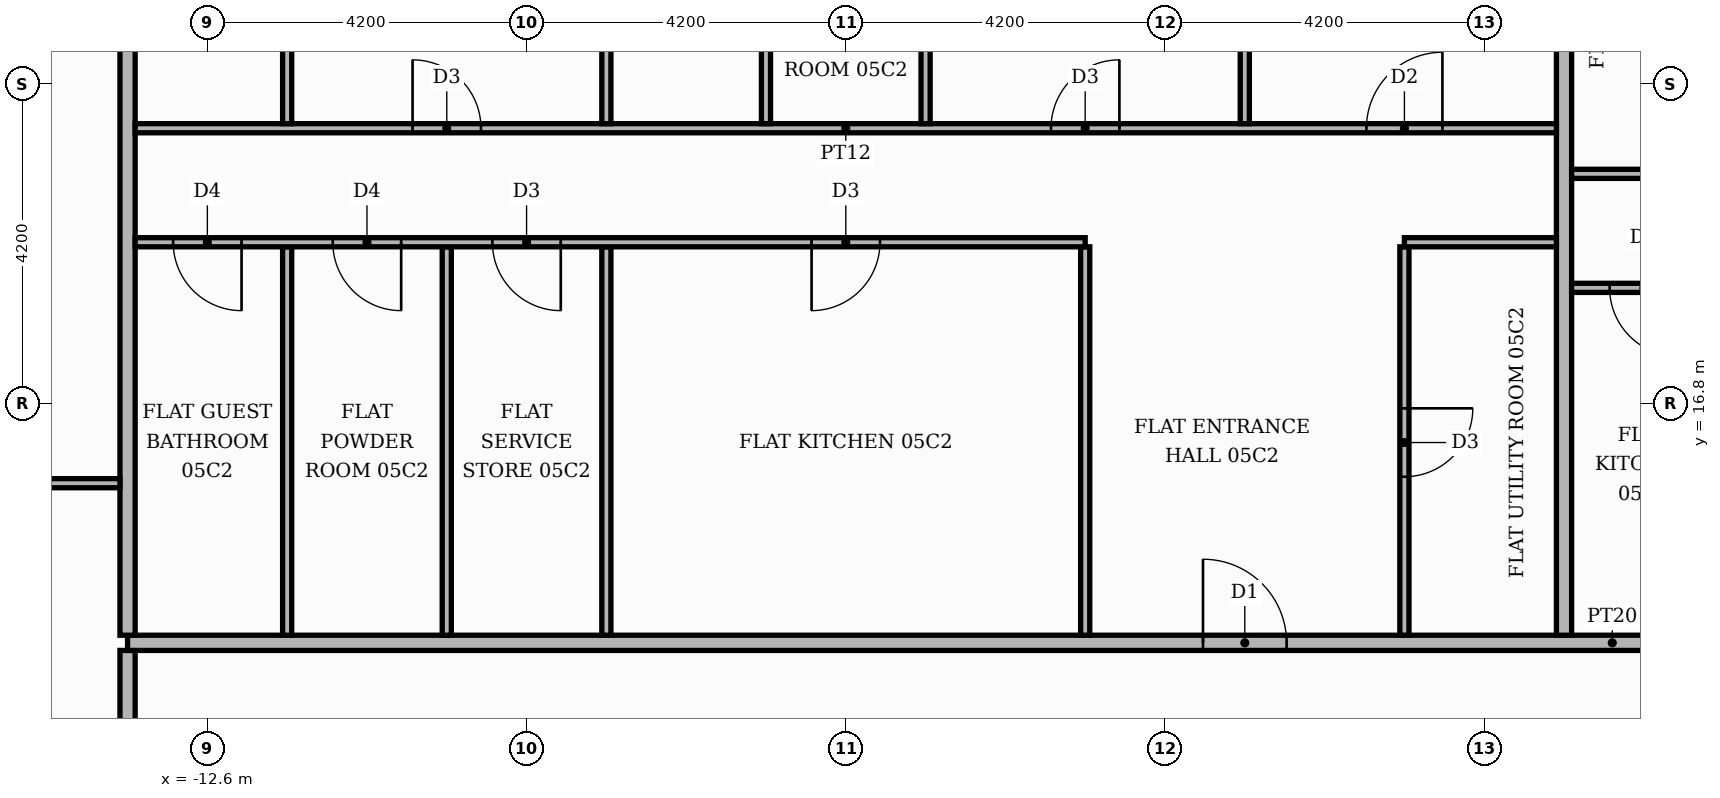
"""IFC4 building model, lengths in metres.
Left out: names, types, materials, properties, quantities, classifications, styles, units other than length and angle.
Written with IfcOpenShell. Run it as: python <this file> out.ifc"""

import sys

from ifc_helpers import new_model, si_unit, direction, frame, frame_2d, origin, place, context, subcontext, project, spatial, rectangle, extrude, element, fill, save


model = new_model("IFC4")
c1 = context("Model", 3, precision=1e-05, world=origin(), true_north=direction((0.0, 1.0)))
c2 = subcontext(c1, "Body", "Model", "MODEL_VIEW")
j1 = project(units=[si_unit("LENGTHUNIT", "METRE"), si_unit("PLANEANGLEUNIT", "RADIAN")], contexts=[c1])
p1 = place(None, origin())
s1 = spatial("IfcSite", under=j1, at=p1, CompositionType="ELEMENT")
p2 = place(p1, origin())
s2 = spatial("IfcBuilding", under=s1, at=p2, CompositionType="ELEMENT")
p3 = place(p2, frame((0.0, 0.0, 27.0)))
s3 = spatial("IfcBuildingStorey", under=s2, at=p3, CompositionType="ELEMENT", Elevation=27.0)
p4 = place(p3, frame((-13.65, -13.55, 0.0), z_axis=(0.0, 0.0, 1.0), x_axis=(0.0, 1.0, 0.0)))
e1 = element("IfcWall", 1, at=p4, inside=s3, PredefinedType="PARTITIONING", context=c2, shape_type="SweptSolid", body=[
    extrude(rectangle(XDim=27.1, YDim=0.2, at=frame_2d((13.55, 0.0))), origin(), (0.0, 0.0, 1.0), 3.48),
])
p5 = place(p4, frame((24.55, 0.0, 0.0)))
e2 = element("IfcOpeningElement", 2, at=p5, cuts=e1, PredefinedType="OPENING", context=c2, shape_type="SweptSolid", body=[
    extrude(rectangle(XDim=1.1, YDim=2.4, at=frame_2d((0.55, 1.2))), frame((0.0, 0.11, 0.0), z_axis=(0.0, -1.0, 0.0), x_axis=(1.0, 0.0, 0.0)), (0.0, 0.0, 1.0), 0.22),
])
p6 = place(p3, frame((-13.65, 13.65, 0.0), z_axis=(0.0, 0.0, 1.0), x_axis=(1.0, 0.0, 0.0)))
e3 = element("IfcWall", 3, at=p6, inside=s3, PredefinedType="PARTITIONING", context=c2, shape_type="SweptSolid", body=[
    extrude(rectangle(XDim=39.07, YDim=0.2, at=frame_2d((19.535, 0.0))), origin(), (0.0, 0.0, 1.0), 3.48),
])
p7 = place(p6, frame((24.65, 0.0, 0.0)))
e4 = element("IfcOpeningElement", 4, at=p7, cuts=e3, PredefinedType="OPENING", context=c2, shape_type="SweptSolid", body=[
    extrude(rectangle(XDim=1.1, YDim=2.4, at=frame_2d((0.55, 1.2))), frame((0.0, 0.11, 0.0), z_axis=(0.0, -1.0, 0.0), x_axis=(1.0, 0.0, 0.0)), (0.0, 0.0, 1.0), 0.22),
])
p8 = place(p6, frame((14.15, 0.0, 0.0)))
e5 = element("IfcOpeningElement", 5, at=p8, cuts=e3, PredefinedType="OPENING", context=c2, shape_type="SweptSolid", body=[
    extrude(rectangle(XDim=1.1, YDim=2.4, at=frame_2d((0.55, 1.2))), frame((0.0, 0.11, 0.0), z_axis=(0.0, -1.0, 0.0), x_axis=(1.0, 0.0, 0.0)), (0.0, 0.0, 1.0), 0.22),
])
p9 = place(p3, frame((-13.65, 13.75, 0.0), z_axis=(0.0, 0.0, 1.0), x_axis=(0.0, 1.0, 0.0)))
e6 = element("IfcWall", 6, at=p9, inside=s3, PredefinedType="PARTITIONING", context=c2, shape_type="SweptSolid", body=[
    extrude(rectangle(XDim=11.67, YDim=0.2, at=frame_2d((5.835, 0.0))), origin(), (0.0, 0.0, 1.0), 3.48),
])
for number, where, z_axis, x_axis in (
    (7, (-11.55, 13.75, 0.0), (0.0, 0.0, 1.0), (0.0, 1.0, 0.0)),
    (8, (-9.45, 13.75, 0.0), (0.0, 0.0, 1.0), (0.0, 1.0, 0.0)),
    (9, (-7.35, 13.75, 0.0), (0.0, 0.0, 1.0), (0.0, 1.0, 0.0)),
    (10, (-1.05, 13.75, 0.0), (0.0, 0.0, 1.0), (0.0, 1.0, 0.0)),
):
    element("IfcWall", number, at=place(p3, frame(where, z_axis=z_axis, x_axis=x_axis)), inside=s3, PredefinedType="PARTITIONING", context=c2, shape_type="SweptSolid", body=[
        extrude(rectangle(XDim=5.11, YDim=0.12, at=frame_2d((2.555, 0.0))), origin(), (0.0, 0.0, 1.0), 3.48),
    ])
p10 = place(p3, frame((3.15, 13.75, 0.0), z_axis=(0.0, 0.0, 1.0), x_axis=(0.0, 1.0, 0.0)))
e11 = element("IfcWall", 11, at=p10, inside=s3, PredefinedType="PARTITIONING", context=c2, shape_type="SweptSolid", body=[
    extrude(rectangle(XDim=5.11, YDim=0.12, at=frame_2d((2.555, 0.0))), origin(), (0.0, 0.0, 1.0), 3.48),
])
p11 = place(p10, frame((2.085, 0.0, 0.0)))
e12 = element("IfcOpeningElement", 12, at=p11, cuts=e11, PredefinedType="OPENING", context=c2, shape_type="SweptSolid", body=[
    extrude(rectangle(XDim=0.9, YDim=2.1, at=frame_2d((0.45, 1.05))), frame((0.0, 0.07, 0.0), z_axis=(0.0, -1.0, 0.0), x_axis=(1.0, 0.0, 0.0)), (0.0, 0.0, 1.0), 0.14),
])
p12 = place(p3, frame((5.25, 13.75, 0.0), z_axis=(0.0, 0.0, 1.0), x_axis=(0.0, 1.0, 0.0)))
e13 = element("IfcWall", 13, at=p12, inside=s3, PredefinedType="PARTITIONING", context=c2, shape_type="SweptSolid", body=[
    extrude(rectangle(XDim=11.67, YDim=0.2, at=frame_2d((5.835, 0.0))), origin(), (0.0, 0.0, 1.0), 3.48),
])
p13 = place(p3, frame((-20.72, 15.75, 0.0), z_axis=(0.0, 0.0, 1.0), x_axis=(1.0, 0.0, 0.0)))
e14 = element("IfcWall", 14, at=p13, inside=s3, PredefinedType="PARTITIONING", context=c2, shape_type="SweptSolid", body=[
    extrude(rectangle(XDim=6.97, YDim=0.12, at=frame_2d((3.485, 0.0))), origin(), (0.0, 0.0, 1.0), 3.48),
])
p14 = place(p13, frame((3.085, 0.0, 0.0)))
e15 = element("IfcOpeningElement", 15, at=p14, cuts=e14, PredefinedType="OPENING", context=c2, shape_type="SweptSolid", body=[
    extrude(rectangle(XDim=0.9, YDim=2.1, at=frame_2d((0.45, 1.05))), frame((0.0, 0.07, 0.0), z_axis=(0.0, -1.0, 0.0), x_axis=(1.0, 0.0, 0.0)), (0.0, 0.0, 1.0), 0.14),
])
p15 = place(p3, frame((5.35, 18.32, 0.0), z_axis=(0.0, 0.0, 1.0), x_axis=(1.0, 0.0, 0.0)))
e16 = element("IfcWall", 16, at=p15, inside=s3, PredefinedType="PARTITIONING", context=c2, shape_type="SweptSolid", body=[
    extrude(rectangle(XDim=4.1, YDim=0.12, at=frame_2d((2.05, 0.0))), origin(), (0.0, 0.0, 1.0), 3.48),
])
p16 = place(p15, frame((0.5, 0.0, 0.0)))
e17 = element("IfcOpeningElement", 17, at=p16, cuts=e16, PredefinedType="OPENING", context=c2, shape_type="SweptSolid", body=[
    extrude(rectangle(XDim=0.9, YDim=2.1, at=frame_2d((0.45, 1.05))), frame((0.0, 0.07, 0.0), z_axis=(0.0, -1.0, 0.0), x_axis=(1.0, 0.0, 0.0)), (0.0, 0.0, 1.0), 0.14),
])
p17 = place(p3, frame((-13.55, 18.92, 0.0), z_axis=(0.0, 0.0, 1.0), x_axis=(1.0, 0.0, 0.0)))
e18 = element("IfcWall", 18, at=p17, inside=s3, PredefinedType="PARTITIONING", context=c2, shape_type="SweptSolid", body=[
    extrude(rectangle(XDim=12.5, YDim=0.12, at=frame_2d((6.25, 0.0))), origin(), (0.0, 0.0, 1.0), 3.48),
])
p18 = place(p17, frame((8.9, 0.0, 0.0)))
e19 = element("IfcOpeningElement", 19, at=p18, cuts=e18, PredefinedType="OPENING", context=c2, shape_type="SweptSolid", body=[
    extrude(rectangle(XDim=0.9, YDim=2.1, at=frame_2d((0.45, 1.05))), frame((0.0, 0.07, 0.0), z_axis=(0.0, -1.0, 0.0), x_axis=(1.0, 0.0, 0.0)), (0.0, 0.0, 1.0), 0.14),
])
p19 = place(p17, frame((4.7, 0.0, 0.0)))
e20 = element("IfcOpeningElement", 20, at=p19, cuts=e18, PredefinedType="OPENING", context=c2, shape_type="SweptSolid", body=[
    extrude(rectangle(XDim=0.9, YDim=2.1, at=frame_2d((0.45, 1.05))), frame((0.0, 0.07, 0.0), z_axis=(0.0, -1.0, 0.0), x_axis=(1.0, 0.0, 0.0)), (0.0, 0.0, 1.0), 0.14),
])
p20 = place(p17, frame((2.6, 0.0, 0.0)))
e21 = element("IfcOpeningElement", 21, at=p20, cuts=e18, PredefinedType="OPENING", context=c2, shape_type="SweptSolid", body=[
    extrude(rectangle(XDim=0.9, YDim=2.1, at=frame_2d((0.45, 1.05))), frame((0.0, 0.07, 0.0), z_axis=(0.0, -1.0, 0.0), x_axis=(1.0, 0.0, 0.0)), (0.0, 0.0, 1.0), 0.14),
])
p21 = place(p17, frame((0.5, 0.0, 0.0)))
e22 = element("IfcOpeningElement", 22, at=p21, cuts=e18, PredefinedType="OPENING", context=c2, shape_type="SweptSolid", body=[
    extrude(rectangle(XDim=0.9, YDim=2.1, at=frame_2d((0.45, 1.05))), frame((0.0, 0.07, 0.0), z_axis=(0.0, -1.0, 0.0), x_axis=(1.0, 0.0, 0.0)), (0.0, 0.0, 1.0), 0.14),
])
p22 = place(p3, frame((3.15, 18.92, 0.0), z_axis=(0.0, 0.0, 1.0), x_axis=(1.0, 0.0, 0.0)))
e23 = element("IfcWall", 23, at=p22, inside=s3, PredefinedType="PARTITIONING", context=c2, shape_type="SweptSolid", body=[
    extrude(rectangle(XDim=2.0, YDim=0.12, at=frame_2d((1.0, 0.0))), origin(), (0.0, 0.0, 1.0), 3.48),
])
p23 = place(p3, frame((5.35, 19.82, 0.0), z_axis=(0.0, 0.0, 1.0), x_axis=(1.0, 0.0, 0.0)))
e24 = element("IfcWall", 24, at=p23, inside=s3, PredefinedType="PARTITIONING", context=c2, shape_type="SweptSolid", body=[
    extrude(rectangle(XDim=11.95, YDim=0.12, at=frame_2d((5.975, 0.0))), origin(), (0.0, 0.0, 1.0), 3.48),
])
p24 = place(p23, frame((8.85, 0.0, 0.0)))
e25 = element("IfcOpeningElement", 25, at=p24, cuts=e24, PredefinedType="OPENING", context=c2, shape_type="SweptSolid", body=[
    extrude(rectangle(XDim=1.0, YDim=2.1, at=frame_2d((0.5, 1.05))), frame((0.0, 0.07, 0.0), z_axis=(0.0, -1.0, 0.0), x_axis=(1.0, 0.0, 0.0)), (0.0, 0.0, 1.0), 0.14),
])
p25 = place(p23, frame((5.75, 0.0, 0.0)))
e26 = element("IfcOpeningElement", 26, at=p25, cuts=e24, PredefinedType="OPENING", context=c2, shape_type="SweptSolid", body=[
    extrude(rectangle(XDim=0.9, YDim=2.1, at=frame_2d((0.45, 1.05))), frame((0.0, 0.07, 0.0), z_axis=(0.0, -1.0, 0.0), x_axis=(1.0, 0.0, 0.0)), (0.0, 0.0, 1.0), 0.14),
])
p26 = place(p3, frame((-13.55, 20.42, 0.0), z_axis=(0.0, 0.0, 1.0), x_axis=(1.0, 0.0, 0.0)))
e27 = element("IfcWall", 27, at=p26, inside=s3, PredefinedType="PARTITIONING", context=c2, shape_type="SweptSolid", body=[
    extrude(rectangle(XDim=18.7, YDim=0.12, at=frame_2d((9.35, 0.0))), origin(), (0.0, 0.0, 1.0), 3.48),
])
p27 = place(p26, frame((16.2, 0.0, 0.0)))
e28 = element("IfcOpeningElement", 28, at=p27, cuts=e27, PredefinedType="OPENING", context=c2, shape_type="SweptSolid", body=[
    extrude(rectangle(XDim=1.0, YDim=2.1, at=frame_2d((0.5, 1.05))), frame((0.0, 0.07, 0.0), z_axis=(0.0, -1.0, 0.0), x_axis=(1.0, 0.0, 0.0)), (0.0, 0.0, 1.0), 0.14),
])
p28 = place(p26, frame((12.05, 0.0, 0.0)))
e29 = element("IfcOpeningElement", 29, at=p28, cuts=e27, PredefinedType="OPENING", context=c2, shape_type="SweptSolid", body=[
    extrude(rectangle(XDim=0.9, YDim=2.1, at=frame_2d((0.45, 1.05))), frame((0.0, 0.07, 0.0), z_axis=(0.0, -1.0, 0.0), x_axis=(1.0, 0.0, 0.0)), (0.0, 0.0, 1.0), 0.14),
])
p29 = place(p26, frame((3.65, 0.0, 0.0)))
e30 = element("IfcOpeningElement", 30, at=p29, cuts=e27, PredefinedType="OPENING", context=c2, shape_type="SweptSolid", body=[
    extrude(rectangle(XDim=0.9, YDim=2.1, at=frame_2d((0.45, 1.05))), frame((0.0, 0.07, 0.0), z_axis=(0.0, -1.0, 0.0), x_axis=(1.0, 0.0, 0.0)), (0.0, 0.0, 1.0), 0.14),
])
p30 = place(p3, frame((-11.55, 20.48, 0.0), z_axis=(0.0, 0.0, 1.0), x_axis=(0.0, 1.0, 0.0)))
e31 = element("IfcWall", 31, at=p30, inside=s3, PredefinedType="PARTITIONING", context=c2, shape_type="SweptSolid", body=[
    extrude(rectangle(XDim=4.94, YDim=0.12, at=frame_2d((2.47, 0.0))), origin(), (0.0, 0.0, 1.0), 3.48),
])
p31 = place(p30, frame((2.14, 0.0, 0.0)))
e32 = element("IfcOpeningElement", 32, at=p31, cuts=e31, PredefinedType="OPENING", context=c2, shape_type="SweptSolid", body=[
    extrude(rectangle(XDim=0.9, YDim=2.1, at=frame_2d((0.45, 1.05))), frame((0.0, 0.07, 0.0), z_axis=(0.0, -1.0, 0.0), x_axis=(1.0, 0.0, 0.0)), (0.0, 0.0, 1.0), 0.14),
])
p32 = place(p3, frame((-7.35, 20.48, 0.0), z_axis=(0.0, 0.0, 1.0), x_axis=(0.0, 1.0, 0.0)))
e33 = element("IfcWall", 33, at=p32, inside=s3, PredefinedType="PARTITIONING", context=c2, shape_type="SweptSolid", body=[
    extrude(rectangle(XDim=4.94, YDim=0.12, at=frame_2d((2.47, 0.0))), origin(), (0.0, 0.0, 1.0), 3.48),
])
p33 = place(p3, frame((-5.25, 20.48, 0.0), z_axis=(0.0, 0.0, 1.0), x_axis=(0.0, 1.0, 0.0)))
e34 = element("IfcWall", 34, at=p33, inside=s3, PredefinedType="PARTITIONING", context=c2, shape_type="SweptSolid", body=[
    extrude(rectangle(XDim=4.94, YDim=0.12, at=frame_2d((2.47, 0.0))), origin(), (0.0, 0.0, 1.0), 3.48),
])
p34 = place(p33, frame((2.14, 0.0, 0.0)))
e35 = element("IfcOpeningElement", 35, at=p34, cuts=e34, PredefinedType="OPENING", context=c2, shape_type="SweptSolid", body=[
    extrude(rectangle(XDim=0.9, YDim=2.1, at=frame_2d((0.45, 1.05))), frame((0.0, 0.07, 0.0), z_axis=(0.0, -1.0, 0.0), x_axis=(1.0, 0.0, 0.0)), (0.0, 0.0, 1.0), 0.14),
])
p35 = place(p3, frame((-3.15, 20.48, 0.0), z_axis=(0.0, 0.0, 1.0), x_axis=(0.0, 1.0, 0.0)))
e36 = element("IfcWall", 36, at=p35, inside=s3, PredefinedType="PARTITIONING", context=c2, shape_type="SweptSolid", body=[
    extrude(rectangle(XDim=4.94, YDim=0.12, at=frame_2d((2.47, 0.0))), origin(), (0.0, 0.0, 1.0), 3.48),
])
p36 = place(p35, frame((2.14, 0.0, 0.0)))
e37 = element("IfcOpeningElement", 37, at=p36, cuts=e36, PredefinedType="OPENING", context=c2, shape_type="SweptSolid", body=[
    extrude(rectangle(XDim=0.9, YDim=2.1, at=frame_2d((0.45, 1.05))), frame((0.0, 0.07, 0.0), z_axis=(0.0, -1.0, 0.0), x_axis=(1.0, 0.0, 0.0)), (0.0, 0.0, 1.0), 0.14),
])
p37 = place(p3, frame((1.05, 20.48, 0.0), z_axis=(0.0, 0.0, 1.0), x_axis=(0.0, 1.0, 0.0)))
e38 = element("IfcWall", 38, at=p37, inside=s3, PredefinedType="PARTITIONING", context=c2, shape_type="SweptSolid", body=[
    extrude(rectangle(XDim=4.94, YDim=0.12, at=frame_2d((2.47, 0.0))), origin(), (0.0, 0.0, 1.0), 3.48),
])
p38 = place(p16, frame((0.9, 0.0, 0.0), z_axis=(0.0, 0.0, 1.0), x_axis=(-1.0, 0.0, 0.0)))
e39 = element("IfcDoor", 39, at=p38, inside=s3, OperationType="SINGLE_SWING_RIGHT", PredefinedType="DOOR", context=c2, shape_type="SweptSolid", body=[
    extrude(rectangle(XDim=0.9, YDim=2.1, at=frame_2d((0.45, 1.05))), frame((0.0, 0.025, 0.0), z_axis=(0.0, -1.0, 0.0), x_axis=(1.0, 0.0, 0.0)), (0.0, 0.0, 1.0), 0.05),
])
fill(e17, e39)
p39 = place(p8, origin())
e40 = element("IfcDoor", 40, at=p39, inside=s3, OperationType="SINGLE_SWING_LEFT", PredefinedType="DOOR", context=c2, shape_type="SweptSolid", body=[
    extrude(rectangle(XDim=1.1, YDim=2.4, at=frame_2d((0.55, 1.2))), frame((0.0, 0.025, 0.0), z_axis=(0.0, -1.0, 0.0), x_axis=(1.0, 0.0, 0.0)), (0.0, 0.0, 1.0), 0.05),
])
fill(e5, e40)
p40 = place(p11, frame((0.9, 0.0, 0.0), z_axis=(0.0, 0.0, 1.0), x_axis=(-1.0, 0.0, 0.0)))
e41 = element("IfcDoor", 41, at=p40, inside=s3, OperationType="SINGLE_SWING_RIGHT", PredefinedType="DOOR", context=c2, shape_type="SweptSolid", body=[
    extrude(rectangle(XDim=0.9, YDim=2.1, at=frame_2d((0.45, 1.05))), frame((0.0, 0.025, 0.0), z_axis=(0.0, -1.0, 0.0), x_axis=(1.0, 0.0, 0.0)), (0.0, 0.0, 1.0), 0.05),
])
fill(e12, e41)
p41 = place(p18, frame((0.9, 0.0, 0.0), z_axis=(0.0, 0.0, 1.0), x_axis=(-1.0, 0.0, 0.0)))
e42 = element("IfcDoor", 42, at=p41, inside=s3, OperationType="SINGLE_SWING_LEFT", PredefinedType="DOOR", context=c2, shape_type="SweptSolid", body=[
    extrude(rectangle(XDim=0.9, YDim=2.1, at=frame_2d((0.45, 1.05))), frame((0.0, 0.025, 0.0), z_axis=(0.0, -1.0, 0.0), x_axis=(1.0, 0.0, 0.0)), (0.0, 0.0, 1.0), 0.05),
])
fill(e19, e42)
p42 = place(p19, frame((0.9, 0.0, 0.0), z_axis=(0.0, 0.0, 1.0), x_axis=(-1.0, 0.0, 0.0)))
e43 = element("IfcDoor", 43, at=p42, inside=s3, OperationType="SINGLE_SWING_RIGHT", PredefinedType="DOOR", context=c2, shape_type="SweptSolid", body=[
    extrude(rectangle(XDim=0.9, YDim=2.1, at=frame_2d((0.45, 1.05))), frame((0.0, 0.025, 0.0), z_axis=(0.0, -1.0, 0.0), x_axis=(1.0, 0.0, 0.0)), (0.0, 0.0, 1.0), 0.05),
])
fill(e20, e43)
p43 = place(p20, frame((0.9, 0.0, 0.0), z_axis=(0.0, 0.0, 1.0), x_axis=(-1.0, 0.0, 0.0)))
e44 = element("IfcDoor", 44, at=p43, inside=s3, OperationType="SINGLE_SWING_RIGHT", PredefinedType="DOOR", context=c2, shape_type="SweptSolid", body=[
    extrude(rectangle(XDim=0.9, YDim=2.1, at=frame_2d((0.45, 1.05))), frame((0.0, 0.025, 0.0), z_axis=(0.0, -1.0, 0.0), x_axis=(1.0, 0.0, 0.0)), (0.0, 0.0, 1.0), 0.05),
])
fill(e21, e44)
p44 = place(p21, frame((0.9, 0.0, 0.0), z_axis=(0.0, 0.0, 1.0), x_axis=(-1.0, 0.0, 0.0)))
e45 = element("IfcDoor", 45, at=p44, inside=s3, OperationType="SINGLE_SWING_RIGHT", PredefinedType="DOOR", context=c2, shape_type="SweptSolid", body=[
    extrude(rectangle(XDim=0.9, YDim=2.1, at=frame_2d((0.45, 1.05))), frame((0.0, 0.025, 0.0), z_axis=(0.0, -1.0, 0.0), x_axis=(1.0, 0.0, 0.0)), (0.0, 0.0, 1.0), 0.05),
])
fill(e22, e45)
p45 = place(p27, origin())
e46 = element("IfcDoor", 46, at=p45, inside=s3, OperationType="SINGLE_SWING_RIGHT", PredefinedType="DOOR", context=c2, shape_type="SweptSolid", body=[
    extrude(rectangle(XDim=1.0, YDim=2.1, at=frame_2d((0.5, 1.05))), frame((0.0, 0.025, 0.0), z_axis=(0.0, -1.0, 0.0), x_axis=(1.0, 0.0, 0.0)), (0.0, 0.0, 1.0), 0.05),
])
fill(e28, e46)
p46 = place(p28, origin())
e47 = element("IfcDoor", 47, at=p46, inside=s3, OperationType="SINGLE_SWING_RIGHT", PredefinedType="DOOR", context=c2, shape_type="SweptSolid", body=[
    extrude(rectangle(XDim=0.9, YDim=2.1, at=frame_2d((0.45, 1.05))), frame((0.0, 0.025, 0.0), z_axis=(0.0, -1.0, 0.0), x_axis=(1.0, 0.0, 0.0)), (0.0, 0.0, 1.0), 0.05),
])
fill(e29, e47)
p47 = place(p29, origin())
e48 = element("IfcDoor", 48, at=p47, inside=s3, OperationType="SINGLE_SWING_LEFT", PredefinedType="DOOR", context=c2, shape_type="SweptSolid", body=[
    extrude(rectangle(XDim=0.9, YDim=2.1, at=frame_2d((0.45, 1.05))), frame((0.0, 0.025, 0.0), z_axis=(0.0, -1.0, 0.0), x_axis=(1.0, 0.0, 0.0)), (0.0, 0.0, 1.0), 0.05),
])
fill(e30, e48)
save(model, sys.argv[1])
